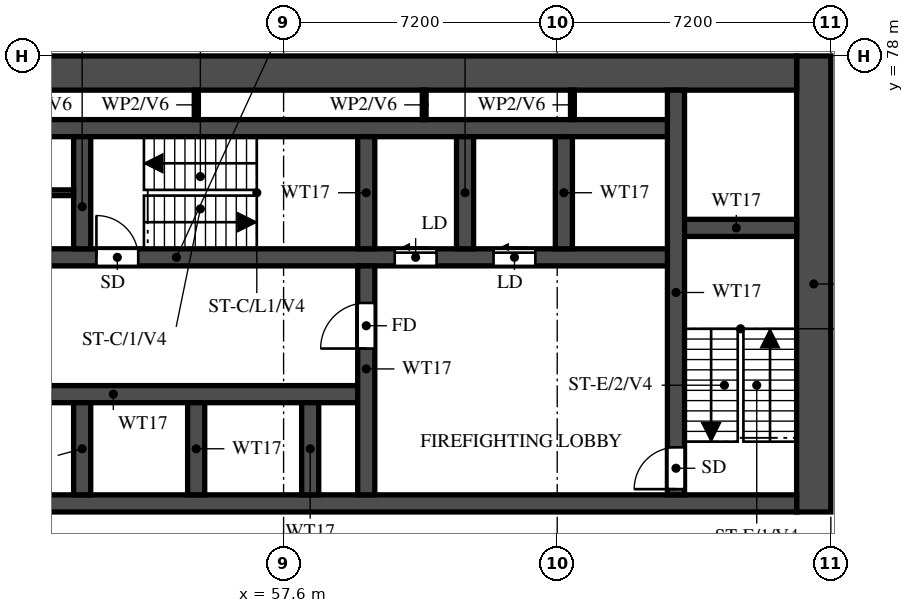
"""IFC4 building model, lengths in metres.
Left out: names, types, materials, properties, quantities, classifications, styles, units other than length and angle.
Written with IfcOpenShell. Run it as: python <this file> out.ifc"""

import sys

from ifc_helpers import new_model, si_unit, direction, frame, frame_2d, origin, place, context, subcontext, project, spatial, rectangle, extrude, element, fill, save


model = new_model("IFC4")
c1 = context("Model", 3, precision=1e-05, world=origin(), true_north=direction((0.0, 1.0)))
c2 = subcontext(c1, "Body", "Model", "MODEL_VIEW")
j1 = project(units=[si_unit("LENGTHUNIT", "METRE"), si_unit("PLANEANGLEUNIT", "RADIAN")], contexts=[c1])
p1 = place(None, origin())
s1 = spatial("IfcSite", under=j1, at=p1, CompositionType="ELEMENT")
p2 = place(p1, origin())
s2 = spatial("IfcBuilding", under=s1, at=p2, CompositionType="ELEMENT")
p3 = place(p2, frame((0.0, 0.0, 17.4)))
s3 = spatial("IfcBuildingStorey", under=s2, at=p3, CompositionType="ELEMENT", Elevation=17.4)
p4 = place(p3, frame((71.55, 66.0, 0.0), z_axis=(0.0, 0.0, 1.0), x_axis=(0.0, 1.0, 0.0)))
e1 = element("IfcWall", 1, at=p4, inside=s3, PredefinedType="SHEAR", context=c2, shape_type="SweptSolid", body=[
    extrude(rectangle(XDim=12.0, YDim=0.9, at=frame_2d((6.0, 0.0))), origin(), (0.0, 0.0, 1.0), 3.8),
])
p5 = place(p3, frame((29.7, 77.55, 0.0), z_axis=(0.0, 0.0, 1.0), x_axis=(1.0, 0.0, 0.0)))
e2 = element("IfcWall", 2, at=p5, inside=s3, PredefinedType="SHEAR", context=c2, shape_type="SweptSolid", body=[
    extrude(rectangle(XDim=41.4, YDim=0.9, at=frame_2d((20.7, 0.0))), origin(), (0.0, 0.0, 1.0), 3.8),
])
p6 = place(p3, frame((29.7, 66.225, 0.0), z_axis=(0.0, 0.0, 1.0), x_axis=(1.0, 0.0, 0.0)))
e3 = element("IfcWall", 3, at=p6, inside=s3, PredefinedType="SHEAR", context=c2, shape_type="SweptSolid", body=[
    extrude(rectangle(XDim=41.4, YDim=0.45, at=frame_2d((20.7, 0.0))), origin(), (0.0, 0.0, 1.0), 3.8),
])
p7 = place(p6, frame((0.925, 0.0, 0.0)))
e4 = element("IfcOpeningElement", 4, at=p7, cuts=e3, PredefinedType="OPENING", context=c2, shape_type="SweptSolid", body=[
    extrude(rectangle(XDim=1.1, YDim=2.1, at=frame_2d((0.55, 1.05))), frame((0.0, 0.235, 0.0), z_axis=(0.0, -1.0, 0.0), x_axis=(1.0, 0.0, 0.0)), (0.0, 0.0, 1.0), 0.47),
])
p8 = place(p6, frame((3.738, 0.0, 0.0)))
e5 = element("IfcOpeningElement", 5, at=p8, cuts=e3, PredefinedType="OPENING", context=c2, shape_type="SweptSolid", body=[
    extrude(rectangle(XDim=1.8, YDim=2.1, at=frame_2d((0.9, 1.05))), frame((0.0, 0.235, 0.0), z_axis=(0.0, -1.0, 0.0), x_axis=(1.0, 0.0, 0.0)), (0.0, 0.0, 1.0), 0.47),
])
p9 = place(p3, frame((35.575, 69.1, 0.0), z_axis=(0.0, 0.0, 1.0), x_axis=(1.0, 0.0, 0.0)))
e6 = element("IfcWall", 6, at=p9, inside=s3, PredefinedType="SHEAR", context=c2, shape_type="SweptSolid", body=[
    extrude(rectangle(XDim=24.2, YDim=0.45, at=frame_2d((12.1, 0.0))), origin(), (0.0, 0.0, 1.0), 3.8),
])
p10 = place(p9, frame((1.05, 0.0, 0.0)))
e7 = element("IfcOpeningElement", 7, at=p10, cuts=e6, PredefinedType="OPENING", context=c2, shape_type="SweptSolid", body=[
    extrude(rectangle(XDim=1.1, YDim=2.1, at=frame_2d((0.55, 1.05))), frame((0.0, 0.235, 0.0), z_axis=(0.0, -1.0, 0.0), x_axis=(1.0, 0.0, 0.0)), (0.0, 0.0, 1.0), 0.47),
])
p11 = place(p9, frame((3.8, 0.0, 0.0)))
e8 = element("IfcOpeningElement", 8, at=p11, cuts=e6, PredefinedType="OPENING", context=c2, shape_type="SweptSolid", body=[
    extrude(rectangle(XDim=1.1, YDim=2.1, at=frame_2d((0.55, 1.05))), frame((0.0, 0.235, 0.0), z_axis=(0.0, -1.0, 0.0), x_axis=(1.0, 0.0, 0.0)), (0.0, 0.0, 1.0), 0.47),
])
p12 = place(p9, frame((6.55, 0.0, 0.0)))
e9 = element("IfcOpeningElement", 9, at=p12, cuts=e6, PredefinedType="OPENING", context=c2, shape_type="SweptSolid", body=[
    extrude(rectangle(XDim=1.1, YDim=2.1, at=frame_2d((0.55, 1.05))), frame((0.0, 0.235, 0.0), z_axis=(0.0, -1.0, 0.0), x_axis=(1.0, 0.0, 0.0)), (0.0, 0.0, 1.0), 0.47),
])
p13 = place(p9, frame((9.3, 0.0, 0.0)))
e10 = element("IfcOpeningElement", 10, at=p13, cuts=e6, PredefinedType="OPENING", context=c2, shape_type="SweptSolid", body=[
    extrude(rectangle(XDim=1.1, YDim=2.1, at=frame_2d((0.55, 1.05))), frame((0.0, 0.235, 0.0), z_axis=(0.0, -1.0, 0.0), x_axis=(1.0, 0.0, 0.0)), (0.0, 0.0, 1.0), 0.47),
])
p14 = place(p9, frame((12.05, 0.0, 0.0)))
e11 = element("IfcOpeningElement", 11, at=p14, cuts=e6, PredefinedType="OPENING", context=c2, shape_type="SweptSolid", body=[
    extrude(rectangle(XDim=1.1, YDim=2.1, at=frame_2d((0.55, 1.05))), frame((0.0, 0.235, 0.0), z_axis=(0.0, -1.0, 0.0), x_axis=(1.0, 0.0, 0.0)), (0.0, 0.0, 1.0), 0.47),
])
p15 = place(p9, frame((14.8, 0.0, 0.0)))
e12 = element("IfcOpeningElement", 12, at=p15, cuts=e6, PredefinedType="OPENING", context=c2, shape_type="SweptSolid", body=[
    extrude(rectangle(XDim=1.1, YDim=2.1, at=frame_2d((0.55, 1.05))), frame((0.0, 0.235, 0.0), z_axis=(0.0, -1.0, 0.0), x_axis=(1.0, 0.0, 0.0)), (0.0, 0.0, 1.0), 0.47),
])
p16 = place(p3, frame((32.875, 72.7, 0.0), z_axis=(0.0, 0.0, 1.0), x_axis=(1.0, 0.0, 0.0)))
e13 = element("IfcWall", 13, at=p16, inside=s3, PredefinedType="SHEAR", context=c2, shape_type="SweptSolid", body=[
    extrude(rectangle(XDim=35.05, YDim=0.45, at=frame_2d((17.525, 0.0))), origin(), (0.0, 0.0, 1.0), 3.8),
])
p17 = place(p16, frame((19.8, 0.0, 0.0)))
e14 = element("IfcOpeningElement", 14, at=p17, cuts=e13, PredefinedType="OPENING", context=c2, shape_type="SweptSolid", body=[
    extrude(rectangle(XDim=1.1, YDim=2.1, at=frame_2d((0.55, 1.05))), frame((0.0, 0.235, 0.0), z_axis=(0.0, -1.0, 0.0), x_axis=(1.0, 0.0, 0.0)), (0.0, 0.0, 1.0), 0.47),
])
p18 = place(p16, frame((27.65, 0.0, 0.0)))
e15 = element("IfcOpeningElement", 15, at=p18, cuts=e13, PredefinedType="OPENING", context=c2, shape_type="SweptSolid", body=[
    extrude(rectangle(XDim=1.1, YDim=2.1, at=frame_2d((0.55, 1.05))), frame((0.0, 0.235, 0.0), z_axis=(0.0, -1.0, 0.0), x_axis=(1.0, 0.0, 0.0)), (0.0, 0.0, 1.0), 0.47),
])
p19 = place(p16, frame((30.25, 0.0, 0.0)))
e16 = element("IfcOpeningElement", 16, at=p19, cuts=e13, PredefinedType="OPENING", context=c2, shape_type="SweptSolid", body=[
    extrude(rectangle(XDim=1.1, YDim=2.1, at=frame_2d((0.55, 1.05))), frame((0.0, 0.235, 0.0), z_axis=(0.0, -1.0, 0.0), x_axis=(1.0, 0.0, 0.0)), (0.0, 0.0, 1.0), 0.47),
])
p20 = place(p16, frame((3.75, 0.0, 0.0)))
e17 = element("IfcOpeningElement", 17, at=p20, cuts=e13, PredefinedType="OPENING", context=c2, shape_type="SweptSolid", body=[
    extrude(rectangle(XDim=1.1, YDim=2.1, at=frame_2d((0.55, 1.05))), frame((0.0, 0.235, 0.0), z_axis=(0.0, -1.0, 0.0), x_axis=(1.0, 0.0, 0.0)), (0.0, 0.0, 1.0), 0.47),
])
p21 = place(p16, frame((6.5, 0.0, 0.0)))
e18 = element("IfcOpeningElement", 18, at=p21, cuts=e13, PredefinedType="OPENING", context=c2, shape_type="SweptSolid", body=[
    extrude(rectangle(XDim=1.1, YDim=2.1, at=frame_2d((0.55, 1.05))), frame((0.0, 0.235, 0.0), z_axis=(0.0, -1.0, 0.0), x_axis=(1.0, 0.0, 0.0)), (0.0, 0.0, 1.0), 0.47),
])
p22 = place(p16, frame((9.25, 0.0, 0.0)))
e19 = element("IfcOpeningElement", 19, at=p22, cuts=e13, PredefinedType="OPENING", context=c2, shape_type="SweptSolid", body=[
    extrude(rectangle(XDim=1.1, YDim=2.1, at=frame_2d((0.55, 1.05))), frame((0.0, 0.235, 0.0), z_axis=(0.0, -1.0, 0.0), x_axis=(1.0, 0.0, 0.0)), (0.0, 0.0, 1.0), 0.47),
])
p23 = place(p16, frame((12.0, 0.0, 0.0)))
e20 = element("IfcOpeningElement", 20, at=p23, cuts=e13, PredefinedType="OPENING", context=c2, shape_type="SweptSolid", body=[
    extrude(rectangle(XDim=1.1, YDim=2.1, at=frame_2d((0.55, 1.05))), frame((0.0, 0.235, 0.0), z_axis=(0.0, -1.0, 0.0), x_axis=(1.0, 0.0, 0.0)), (0.0, 0.0, 1.0), 0.47),
])
p24 = place(p16, frame((14.75, 0.0, 0.0)))
e21 = element("IfcOpeningElement", 21, at=p24, cuts=e13, PredefinedType="OPENING", context=c2, shape_type="SweptSolid", body=[
    extrude(rectangle(XDim=1.1, YDim=2.1, at=frame_2d((0.55, 1.05))), frame((0.0, 0.235, 0.0), z_axis=(0.0, -1.0, 0.0), x_axis=(1.0, 0.0, 0.0)), (0.0, 0.0, 1.0), 0.47),
])
p25 = place(p16, frame((17.5, 0.0, 0.0)))
e22 = element("IfcOpeningElement", 22, at=p25, cuts=e13, PredefinedType="OPENING", context=c2, shape_type="SweptSolid", body=[
    extrude(rectangle(XDim=1.1, YDim=2.1, at=frame_2d((0.55, 1.05))), frame((0.0, 0.235, 0.0), z_axis=(0.0, -1.0, 0.0), x_axis=(1.0, 0.0, 0.0)), (0.0, 0.0, 1.0), 0.47),
])
p26 = place(p16, frame((0.913, 0.0, 0.0)))
e23 = element("IfcOpeningElement", 23, at=p26, cuts=e13, PredefinedType="OPENING", context=c2, shape_type="SweptSolid", body=[
    extrude(rectangle(XDim=1.1, YDim=2.1, at=frame_2d((0.55, 1.05))), frame((0.0, 0.235, 0.0), z_axis=(0.0, -1.0, 0.0), x_axis=(1.0, 0.0, 0.0)), (0.0, 0.0, 1.0), 0.47),
])
p27 = place(p3, frame((32.875, 76.1, 0.0), z_axis=(0.0, 0.0, 1.0), x_axis=(1.0, 0.0, 0.0)))
e24 = element("IfcWall", 24, at=p27, inside=s3, PredefinedType="SHEAR", context=c2, shape_type="SweptSolid", body=[
    extrude(rectangle(XDim=35.05, YDim=0.45, at=frame_2d((17.525, 0.0))), origin(), (0.0, 0.0, 1.0), 3.8),
])
p28 = place(p3, frame((67.925, 73.475, 0.0), z_axis=(0.0, 0.0, 1.0), x_axis=(1.0, 0.0, 0.0)))
e25 = element("IfcWall", 25, at=p28, inside=s3, PredefinedType="SHEAR", context=c2, shape_type="SweptSolid", body=[
    extrude(rectangle(XDim=3.175, YDim=0.45, at=frame_2d((1.587, 0.0))), origin(), (0.0, 0.0, 1.0), 3.8),
])
p29 = place(p3, frame((67.925, 66.45, 0.0), z_axis=(0.0, 0.0, 1.0), x_axis=(0.0, 1.0, 0.0)))
e26 = element("IfcWall", 26, at=p29, inside=s3, PredefinedType="SHEAR", context=c2, shape_type="SweptSolid", body=[
    extrude(rectangle(XDim=10.65, YDim=0.45, at=frame_2d((5.325, 0.0))), origin(), (0.0, 0.0, 1.0), 3.8),
])
p30 = place(p29, frame((0.15, 0.0, 0.0)))
e27 = element("IfcOpeningElement", 27, at=p30, cuts=e26, PredefinedType="OPENING", context=c2, shape_type="SweptSolid", body=[
    extrude(rectangle(XDim=1.1, YDim=2.1, at=frame_2d((0.55, 1.05))), frame((0.0, 0.235, 0.0), z_axis=(0.0, -1.0, 0.0), x_axis=(1.0, 0.0, 0.0)), (0.0, 0.0, 1.0), 0.47),
])
p31 = place(p3, frame((59.775, 66.45, 0.0), z_axis=(0.0, 0.0, 1.0), x_axis=(0.0, 1.0, 0.0)))
e28 = element("IfcWall", 28, at=p31, inside=s3, PredefinedType="SHEAR", context=c2, shape_type="SweptSolid", body=[
    extrude(rectangle(XDim=6.025, YDim=0.45, at=frame_2d((3.013, 0.0))), origin(), (0.0, 0.0, 1.0), 3.8),
])
p32 = place(p31, frame((3.85, 0.0, 0.0)))
e29 = element("IfcOpeningElement", 29, at=p32, cuts=e28, PredefinedType="OPENING", context=c2, shape_type="SweptSolid", body=[
    extrude(rectangle(XDim=1.2, YDim=2.1, at=frame_2d((0.6, 1.05))), frame((0.0, 0.235, 0.0), z_axis=(0.0, -1.0, 0.0), x_axis=(1.0, 0.0, 0.0)), (0.0, 0.0, 1.0), 0.47),
])
p33 = place(p3, frame((59.775, 72.925, 0.0), z_axis=(0.0, 0.0, 1.0), x_axis=(0.0, 1.0, 0.0)))
e30 = element("IfcWall", 30, at=p33, inside=s3, PredefinedType="SHEAR", context=c2, shape_type="SweptSolid", body=[
    extrude(rectangle(XDim=2.95, YDim=0.45, at=frame_2d((1.475, 0.0))), origin(), (0.0, 0.0, 1.0), 3.8),
])
for number, where, z_axis, x_axis in (
    (31, (52.3, 66.45, 0.0), (0.0, 0.0, 1.0), (0.0, 1.0, 0.0)),
    (32, (55.3, 66.45, 0.0), (0.0, 0.0, 1.0), (0.0, 1.0, 0.0)),
    (33, (58.3, 66.45, 0.0), (0.0, 0.0, 1.0), (0.0, 1.0, 0.0)),
):
    element("IfcWall", number, at=place(p3, frame(where, z_axis=z_axis, x_axis=x_axis)), inside=s3, PredefinedType="SHEAR", context=c2, shape_type="SweptSolid", body=[
        extrude(rectangle(XDim=2.425, YDim=0.45, at=frame_2d((1.212, 0.0))), origin(), (0.0, 0.0, 1.0), 3.8),
    ])
for number, where, z_axis, x_axis in (
    (34, (52.3, 72.925, 0.0), (0.0, 0.0, 1.0), (0.0, 1.0, 0.0)),
    (35, (62.375, 72.925, 0.0), (0.0, 0.0, 1.0), (0.0, 1.0, 0.0)),
    (36, (64.975, 72.925, 0.0), (0.0, 0.0, 1.0), (0.0, 1.0, 0.0)),
):
    element("IfcWall", number, at=place(p3, frame(where, z_axis=z_axis, x_axis=x_axis)), inside=s3, PredefinedType="SHEAR", context=c2, shape_type="SweptSolid", body=[
        extrude(rectangle(XDim=2.95, YDim=0.45, at=frame_2d((1.475, 0.0))), origin(), (0.0, 0.0, 1.0), 3.8),
    ])
p34 = place(p3, frame((49.775, 74.4, 0.0), z_axis=(0.0, 0.0, 1.0), x_axis=(1.0, 0.0, 0.0)))
e37 = element("IfcWall", 37, at=p34, inside=s3, PredefinedType="PARTITIONING", context=c2, shape_type="SweptSolid", body=[
    extrude(rectangle(XDim=2.3, YDim=0.15, at=frame_2d((1.15, 0.0))), origin(), (0.0, 0.0, 1.0), 3.8),
])
p35 = place(p34, frame((0.7, 0.0, 0.0)))
e38 = element("IfcOpeningElement", 38, at=p35, cuts=e37, PredefinedType="OPENING", context=c2, shape_type="SweptSolid", body=[
    extrude(rectangle(XDim=0.9, YDim=2.1, at=frame_2d((0.45, 1.05))), frame((0.0, 0.085, 0.0), z_axis=(0.0, -1.0, 0.0), x_axis=(1.0, 0.0, 0.0)), (0.0, 0.0, 1.0), 0.17),
])
for number, where, z_axis, x_axis in (
    (39, (55.3, 76.325, 0.0), (0.0, 0.0, 1.0), (0.0, 1.0, 0.0)),
    (40, (61.3, 76.325, 0.0), (0.0, 0.0, 1.0), (0.0, 1.0, 0.0)),
    (41, (65.2, 76.325, 0.0), (0.0, 0.0, 1.0), (0.0, 1.0, 0.0)),
):
    element("IfcWall", number, at=place(p3, frame(where, z_axis=z_axis, x_axis=x_axis)), inside=s3, PredefinedType="PARTITIONING", context=c2, shape_type="SweptSolid", body=[
        extrude(rectangle(XDim=0.775, YDim=0.1, at=frame_2d((0.388, 0.0))), origin(), (0.0, 0.0, 1.0), 3.8),
    ])
p36 = place(p17, origin())
e42 = element("IfcDoor", 42, at=p36, inside=s3, OperationType="SINGLE_SWING_LEFT", PredefinedType="DOOR", context=c2, shape_type="SweptSolid", body=[
    extrude(rectangle(XDim=1.1, YDim=2.1, at=frame_2d((0.55, 1.05))), frame((0.0, 0.025, 0.0), z_axis=(0.0, -1.0, 0.0), x_axis=(1.0, 0.0, 0.0)), (0.0, 0.0, 1.0), 0.05),
])
fill(e14, e42)
p37 = place(p30, origin())
e43 = element("IfcDoor", 43, at=p37, inside=s3, OperationType="SINGLE_SWING_LEFT", PredefinedType="DOOR", context=c2, shape_type="SweptSolid", body=[
    extrude(rectangle(XDim=1.1, YDim=2.1, at=frame_2d((0.55, 1.05))), frame((0.0, 0.025, 0.0), z_axis=(0.0, -1.0, 0.0), x_axis=(1.0, 0.0, 0.0)), (0.0, 0.0, 1.0), 0.05),
])
fill(e27, e43)
p38 = place(p32, origin())
e44 = element("IfcDoor", 44, at=p38, inside=s3, OperationType="SINGLE_SWING_RIGHT", PredefinedType="DOOR", context=c2, shape_type="SweptSolid", body=[
    extrude(rectangle(XDim=1.2, YDim=2.1, at=frame_2d((0.6, 1.05))), frame((0.0, 0.025, 0.0), z_axis=(0.0, -1.0, 0.0), x_axis=(1.0, 0.0, 0.0)), (0.0, 0.0, 1.0), 0.05),
])
fill(e29, e44)
p39 = place(p18, origin())
e45 = element("IfcDoor", 45, at=p39, inside=s3, OperationType="SLIDING_TO_LEFT", PredefinedType="DOOR", context=c2, shape_type="SweptSolid", body=[
    extrude(rectangle(XDim=1.1, YDim=2.1, at=frame_2d((0.55, 1.05))), frame((0.0, 0.025, 0.0), z_axis=(0.0, -1.0, 0.0), x_axis=(1.0, 0.0, 0.0)), (0.0, 0.0, 1.0), 0.05),
])
fill(e15, e45)
p40 = place(p19, origin())
e46 = element("IfcDoor", 46, at=p40, inside=s3, OperationType="SLIDING_TO_LEFT", PredefinedType="DOOR", context=c2, shape_type="SweptSolid", body=[
    extrude(rectangle(XDim=1.1, YDim=2.1, at=frame_2d((0.55, 1.05))), frame((0.0, 0.025, 0.0), z_axis=(0.0, -1.0, 0.0), x_axis=(1.0, 0.0, 0.0)), (0.0, 0.0, 1.0), 0.05),
])
fill(e16, e46)
save(model, sys.argv[1])
